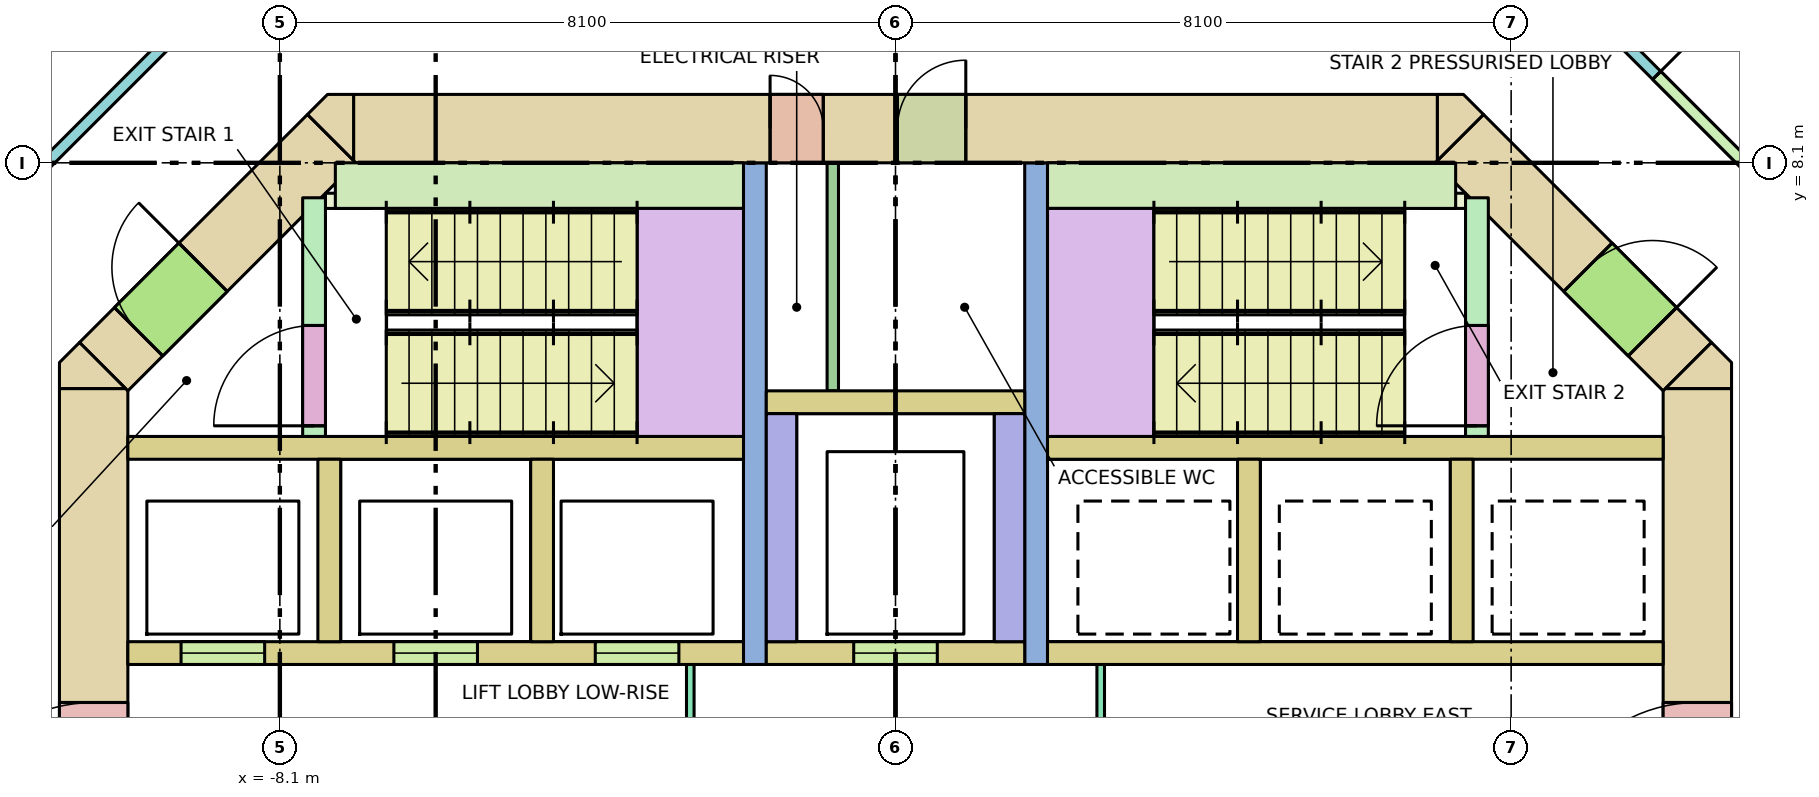
"""IFC4 building model, lengths in metres.
Left out: names, types, materials, properties, quantities, classifications, styles, units other than length and angle.
Written with IfcOpenShell. Run it as: python <this file> out.ifc"""

import sys

from ifc_helpers import new_model, si_unit, direction, frame, frame_2d, origin, place, context, subcontext, project, spatial, polyline, rectangle, outline, extrude, element, fill, save


model = new_model("IFC4")
c1 = context("Model", 3, precision=1e-05, world=origin(), true_north=direction((0.0, 1.0)))
c2 = subcontext(c1, "Body", "Model", "MODEL_VIEW")
j1 = project(units=[si_unit("LENGTHUNIT", "METRE"), si_unit("PLANEANGLEUNIT", "RADIAN")], contexts=[c1])
p1 = place(None, origin())
s1 = spatial("IfcSite", under=j1, at=p1, CompositionType="ELEMENT")
p2 = place(p1, origin())
s2 = spatial("IfcBuilding", under=s1, at=p2, CompositionType="ELEMENT")
p3 = place(p2, frame((0.0, 0.0, 86.6)))
s3 = spatial("IfcBuildingStorey", under=s2, at=p3, CompositionType="ELEMENT", Elevation=86.6)
p4 = place(p3, frame((-7.13, 8.55, -0.28), z_axis=(0.0, 0.0, 1.0), x_axis=(1.0, 0.0, 0.0)))
e1 = element("IfcWall", 1, at=p4, inside=s3, PredefinedType="SHEAR", context=c2, shape_type="SweptSolid", body=[
    extrude(rectangle(XDim=14.26, YDim=0.9, at=frame_2d((7.13, 0.0))), origin(), (0.0, 0.0, 1.0), 4.0),
])
p5 = place(p4, frame((5.48, 0.0, 0.28)))
e2 = element("IfcOpeningElement", 2, at=p5, cuts=e1, PredefinedType="OPENING", context=c2, shape_type="SweptSolid", body=[
    extrude(rectangle(XDim=0.7, YDim=2.1, at=frame_2d((0.35, 1.05))), frame((0.0, 0.46, 0.0), z_axis=(0.0, -1.0, 0.0), x_axis=(1.0, 0.0, 0.0)), (0.0, 0.0, 1.0), 0.92),
])
p6 = place(p4, frame((7.155, 0.0, 0.28)))
e3 = element("IfcOpeningElement", 3, at=p6, cuts=e1, PredefinedType="OPENING", context=c2, shape_type="SweptSolid", body=[
    extrude(rectangle(XDim=0.9, YDim=2.1, at=frame_2d((0.45, 1.05))), frame((0.0, 0.46, 0.0), z_axis=(0.0, -1.0, 0.0), x_axis=(1.0, 0.0, 0.0)), (0.0, 0.0, 1.0), 0.92),
])
p7 = place(p3, frame((-10.55, -5.13, -0.28), z_axis=(0.0, 0.0, 1.0), x_axis=(0.0, 1.0, 0.0)))
e4 = element("IfcWall", 4, at=p7, inside=s3, PredefinedType="SHEAR", context=c2, shape_type="SweptSolid", body=[
    extrude(rectangle(XDim=10.26, YDim=0.9, at=frame_2d((5.13, 0.0))), origin(), (0.0, 0.0, 1.0), 4.0),
])
p8 = place(p7, frame((4.13, 0.0, 0.28)))
e5 = element("IfcOpeningElement", 5, at=p8, cuts=e4, PredefinedType="OPENING", context=c2, shape_type="SweptSolid", body=[
    extrude(rectangle(XDim=2.0, YDim=2.1, at=frame_2d((1.0, 1.05))), frame((0.0, 0.46, 0.0), z_axis=(0.0, -1.0, 0.0), x_axis=(1.0, 0.0, 0.0)), (0.0, 0.0, 1.0), 0.92),
])
p9 = place(p3, frame((10.55, -5.13, -0.28), z_axis=(0.0, 0.0, 1.0), x_axis=(0.0, 1.0, 0.0)))
e6 = element("IfcWall", 6, at=p9, inside=s3, PredefinedType="SHEAR", context=c2, shape_type="SweptSolid", body=[
    extrude(rectangle(XDim=10.26, YDim=0.9, at=frame_2d((5.13, 0.0))), origin(), (0.0, 0.0, 1.0), 4.0),
])
p10 = place(p9, frame((4.13, 0.0, 0.28)))
e7 = element("IfcOpeningElement", 7, at=p10, cuts=e6, PredefinedType="OPENING", context=c2, shape_type="SweptSolid", body=[
    extrude(rectangle(XDim=2.0, YDim=2.1, at=frame_2d((1.0, 1.05))), frame((0.0, 0.46, 0.0), z_axis=(0.0, -1.0, 0.0), x_axis=(1.0, 0.0, 0.0)), (0.0, 0.0, 1.0), 0.92),
])
p11 = place(p3, frame((-10.418, 5.418, -0.28), z_axis=(0.0, 0.0, 1.0), x_axis=(0.707106781187, 0.707106781187, 0.0)))
e8 = element("IfcWall", 8, at=p11, inside=s3, PredefinedType="SHEAR", context=c2, shape_type="SweptSolid", body=[
    extrude(rectangle(XDim=4.243, YDim=0.9, at=frame_2d((2.121, 0.0))), origin(), (0.0, 0.0, 1.0), 4.0),
])
p12 = place(p11, frame((0.65, 0.0, 0.28)))
e9 = element("IfcOpeningElement", 9, at=p12, cuts=e8, PredefinedType="OPENING", context=c2, shape_type="SweptSolid", body=[
    extrude(rectangle(XDim=1.2, YDim=2.1, at=frame_2d((0.6, 1.05))), frame((0.0, 0.46, 0.0), z_axis=(0.0, -1.0, 0.0), x_axis=(1.0, 0.0, 0.0)), (0.0, 0.0, 1.0), 0.92),
])
p13 = place(p3, frame((7.418, 8.418, -0.28), z_axis=(0.0, 0.0, 1.0), x_axis=(0.707106781187, -0.707106781187, 0.0)))
e10 = element("IfcWall", 10, at=p13, inside=s3, PredefinedType="SHEAR", context=c2, shape_type="SweptSolid", body=[
    extrude(rectangle(XDim=4.243, YDim=0.9, at=frame_2d((2.121, 0.0))), origin(), (0.0, 0.0, 1.0), 4.0),
])
p14 = place(p13, frame((2.393, 0.0, 0.28)))
e11 = element("IfcOpeningElement", 11, at=p14, cuts=e10, PredefinedType="OPENING", context=c2, shape_type="SweptSolid", body=[
    extrude(rectangle(XDim=1.2, YDim=2.1, at=frame_2d((0.6, 1.05))), frame((0.0, 0.46, 0.0), z_axis=(0.0, -1.0, 0.0), x_axis=(1.0, 0.0, 0.0)), (0.0, 0.0, 1.0), 0.92),
])
p15 = place(p3, frame((0.0, 0.0, -0.28)))
e12 = element("IfcWall", 12, at=p15, inside=s3, PredefinedType="SHEAR", context=c2, shape_type="SweptSolid", body=[
    extrude(outline(polyline([(-10.736, 5.736), (-10.13, 5.13), (-11.0, 5.13), (-11.0, 5.473), (-10.736, 5.736)])), origin(), (0.0, 0.0, 1.0), 4.0),
])
p16 = place(p3, frame((0.0, 0.0, -0.28)))
e13 = element("IfcWall", 13, at=p16, inside=s3, PredefinedType="SHEAR", context=c2, shape_type="SweptSolid", body=[
    extrude(outline(polyline([(11.0, 5.473), (11.0, 5.13), (10.13, 5.13), (10.736, 5.736), (11.0, 5.473)])), origin(), (0.0, 0.0, 1.0), 4.0),
])
p17 = place(p3, frame((0.0, 0.0, -0.28)))
e14 = element("IfcWall", 14, at=p17, inside=s3, PredefinedType="SHEAR", context=c2, shape_type="SweptSolid", body=[
    extrude(outline(polyline([(-7.473, 9.0), (-7.13, 9.0), (-7.13, 8.13), (-7.736, 8.736), (-7.473, 9.0)])), origin(), (0.0, 0.0, 1.0), 4.0),
])
p18 = place(p3, frame((0.0, 0.0, -0.28)))
e15 = element("IfcWall", 15, at=p18, inside=s3, PredefinedType="SHEAR", context=c2, shape_type="SweptSolid", body=[
    extrude(outline(polyline([(7.473, 9.0), (7.736, 8.736), (7.13, 8.13), (7.13, 9.0), (7.473, 9.0)])), origin(), (0.0, 0.0, 1.0), 4.0),
])
for number, where, z_axis, x_axis in (
    (16, (-10.1, 4.35, 0.0), (0.0, 0.0, 1.0), (1.0, 0.0, 0.0)),
    (17, (2.0, 4.35, 0.0), (0.0, 0.0, 1.0), (1.0, 0.0, 0.0)),
):
    element("IfcWall", number, at=place(p3, frame(where, z_axis=z_axis, x_axis=x_axis)), inside=s3, PredefinedType="SOLIDWALL", context=c2, shape_type="SweptSolid", body=[
        extrude(rectangle(XDim=8.1, YDim=0.3, at=frame_2d((4.05, 0.0))), origin(), (0.0, 0.0, 1.0), 3.72),
    ])
p19 = place(p3, frame((-10.1, 1.65, 0.0), z_axis=(0.0, 0.0, 1.0), x_axis=(1.0, 0.0, 0.0)))
e18 = element("IfcWall", 18, at=p19, inside=s3, PredefinedType="SOLIDWALL", context=c2, shape_type="SweptSolid", body=[
    extrude(rectangle(XDim=8.1, YDim=0.3, at=frame_2d((4.05, 0.0))), origin(), (0.0, 0.0, 1.0), 3.72),
])
p20 = place(p19, frame((0.7, 0.0, 0.0)))
e19 = element("IfcOpeningElement", 19, at=p20, cuts=e18, PredefinedType="OPENING", context=c2, shape_type="SweptSolid", body=[
    extrude(rectangle(XDim=1.1, YDim=2.1, at=frame_2d((0.55, 1.05))), frame((0.0, 0.16, 0.0), z_axis=(0.0, -1.0, 0.0), x_axis=(1.0, 0.0, 0.0)), (0.0, 0.0, 1.0), 0.32),
])
p21 = place(p19, frame((3.5, 0.0, 0.0)))
e20 = element("IfcOpeningElement", 20, at=p21, cuts=e18, PredefinedType="OPENING", context=c2, shape_type="SweptSolid", body=[
    extrude(rectangle(XDim=1.1, YDim=2.1, at=frame_2d((0.55, 1.05))), frame((0.0, 0.16, 0.0), z_axis=(0.0, -1.0, 0.0), x_axis=(1.0, 0.0, 0.0)), (0.0, 0.0, 1.0), 0.32),
])
p22 = place(p19, frame((6.15, 0.0, 0.0)))
e21 = element("IfcOpeningElement", 21, at=p22, cuts=e18, PredefinedType="OPENING", context=c2, shape_type="SweptSolid", body=[
    extrude(rectangle(XDim=1.1, YDim=2.1, at=frame_2d((0.55, 1.05))), frame((0.0, 0.16, 0.0), z_axis=(0.0, -1.0, 0.0), x_axis=(1.0, 0.0, 0.0)), (0.0, 0.0, 1.0), 0.32),
])
p23 = place(p3, frame((2.0, 1.65, 0.0), z_axis=(0.0, 0.0, 1.0), x_axis=(1.0, 0.0, 0.0)))
e22 = element("IfcWall", 22, at=p23, inside=s3, PredefinedType="SOLIDWALL", context=c2, shape_type="SweptSolid", body=[
    extrude(rectangle(XDim=8.1, YDim=0.3, at=frame_2d((4.05, 0.0))), origin(), (0.0, 0.0, 1.0), 3.72),
])
for number, where, z_axis, x_axis in (
    (23, (-7.45, 1.8, 0.0), (0.0, 0.0, 1.0), (0.0, 1.0, 0.0)),
    (24, (-4.65, 1.8, 0.0), (0.0, 0.0, 1.0), (0.0, 1.0, 0.0)),
    (25, (4.65, 1.8, 0.0), (0.0, 0.0, 1.0), (0.0, 1.0, 0.0)),
    (26, (7.45, 1.8, 0.0), (0.0, 0.0, 1.0), (0.0, 1.0, 0.0)),
):
    element("IfcWall", number, at=place(p3, frame(where, z_axis=z_axis, x_axis=x_axis)), inside=s3, PredefinedType="SOLIDWALL", context=c2, shape_type="SweptSolid", body=[
        extrude(rectangle(XDim=2.4, YDim=0.3, at=frame_2d((1.2, 0.0))), origin(), (0.0, 0.0, 1.0), 3.72),
    ])
for number, where, z_axis, x_axis in (
    (27, (-1.85, 1.5, 0.0), (0.0, 0.0, 1.0), (0.0, 1.0, 0.0)),
    (28, (1.85, 1.5, 0.0), (0.0, 0.0, 1.0), (0.0, 1.0, 0.0)),
):
    element("IfcWall", number, at=place(p3, frame(where, z_axis=z_axis, x_axis=x_axis)), inside=s3, PredefinedType="SHEAR", context=c2, shape_type="SweptSolid", body=[
        extrude(rectangle(XDim=6.6, YDim=0.3, at=frame_2d((3.3, 0.0))), origin(), (0.0, 0.0, 1.0), 3.72),
    ])
p24 = place(p3, frame((-1.7, 1.65, 0.0), z_axis=(0.0, 0.0, 1.0), x_axis=(1.0, 0.0, 0.0)))
e29 = element("IfcWall", 29, at=p24, inside=s3, PredefinedType="SOLIDWALL", context=c2, shape_type="SweptSolid", body=[
    extrude(rectangle(XDim=3.4, YDim=0.3, at=frame_2d((1.7, 0.0))), origin(), (0.0, 0.0, 1.0), 3.72),
])
p25 = place(p24, frame((1.15, 0.0, 0.0)))
e30 = element("IfcOpeningElement", 30, at=p25, cuts=e29, PredefinedType="OPENING", context=c2, shape_type="SweptSolid", body=[
    extrude(rectangle(XDim=1.1, YDim=2.1, at=frame_2d((0.55, 1.05))), frame((0.0, 0.16, 0.0), z_axis=(0.0, -1.0, 0.0), x_axis=(1.0, 0.0, 0.0)), (0.0, 0.0, 1.0), 0.32),
])
for number, where, z_axis, x_axis in (
    (31, (-1.5, 1.8, 0.0), (0.0, 0.0, 1.0), (0.0, 1.0, 0.0)),
    (32, (1.5, 1.8, 0.0), (0.0, 0.0, 1.0), (0.0, 1.0, 0.0)),
):
    element("IfcWall", number, at=place(p3, frame(where, z_axis=z_axis, x_axis=x_axis)), inside=s3, PredefinedType="SOLIDWALL", context=c2, shape_type="SweptSolid", body=[
        extrude(rectangle(XDim=3.0, YDim=0.4, at=frame_2d((1.5, 0.0))), origin(), (0.0, 0.0, 1.0), 3.72),
    ])
p26 = place(p3, frame((-1.7, 4.95, 0.0), z_axis=(0.0, 0.0, 1.0), x_axis=(1.0, 0.0, 0.0)))
e33 = element("IfcWall", 33, at=p26, inside=s3, PredefinedType="SOLIDWALL", context=c2, shape_type="SweptSolid", body=[
    extrude(rectangle(XDim=3.4, YDim=0.3, at=frame_2d((1.7, 0.0))), origin(), (0.0, 0.0, 1.0), 3.72),
])
p27 = place(p3, frame((-7.65, 4.5, 0.0), z_axis=(0.0, 0.0, 1.0), x_axis=(0.0, 1.0, 0.0)))
e34 = element("IfcWall", 34, at=p27, inside=s3, PredefinedType="SHEAR", context=c2, shape_type="SweptSolid", body=[
    extrude(rectangle(XDim=3.14, YDim=0.3, at=frame_2d((1.57, 0.0))), origin(), (0.0, 0.0, 1.0), 3.72),
])
p28 = place(p27, frame((0.14, 0.0, 0.0)))
e35 = element("IfcOpeningElement", 35, at=p28, cuts=e34, PredefinedType="OPENING", context=c2, shape_type="SweptSolid", body=[
    extrude(rectangle(XDim=1.32, YDim=2.1, at=frame_2d((0.66, 1.05))), frame((0.0, 0.16, 0.0), z_axis=(0.0, -1.0, 0.0), x_axis=(1.0, 0.0, 0.0)), (0.0, 0.0, 1.0), 0.32),
])
p29 = place(p3, frame((-7.37, 7.8, 0.0), z_axis=(0.0, 0.0, 1.0), x_axis=(1.0, 0.0, 0.0)))
e36 = element("IfcWall", 36, at=p29, inside=s3, PredefinedType="SHEAR", context=c2, shape_type="SweptSolid", body=[
    extrude(rectangle(XDim=5.37, YDim=0.6, at=frame_2d((2.685, 0.0))), origin(), (0.0, 0.0, 1.0), 3.72),
])
p30 = place(p3, frame((7.65, 4.5, 0.0), z_axis=(0.0, 0.0, 1.0), x_axis=(0.0, 1.0, 0.0)))
e37 = element("IfcWall", 37, at=p30, inside=s3, PredefinedType="SHEAR", context=c2, shape_type="SweptSolid", body=[
    extrude(rectangle(XDim=3.14, YDim=0.3, at=frame_2d((1.57, 0.0))), origin(), (0.0, 0.0, 1.0), 3.72),
])
p31 = place(p30, frame((0.14, 0.0, 0.0)))
e38 = element("IfcOpeningElement", 38, at=p31, cuts=e37, PredefinedType="OPENING", context=c2, shape_type="SweptSolid", body=[
    extrude(rectangle(XDim=1.32, YDim=2.1, at=frame_2d((0.66, 1.05))), frame((0.0, 0.16, 0.0), z_axis=(0.0, -1.0, 0.0), x_axis=(1.0, 0.0, 0.0)), (0.0, 0.0, 1.0), 0.32),
])
p32 = place(p3, frame((2.0, 7.8, 0.0), z_axis=(0.0, 0.0, 1.0), x_axis=(1.0, 0.0, 0.0)))
e39 = element("IfcWall", 39, at=p32, inside=s3, PredefinedType="SHEAR", context=c2, shape_type="SweptSolid", body=[
    extrude(rectangle(XDim=5.37, YDim=0.6, at=frame_2d((2.685, 0.0))), origin(), (0.0, 0.0, 1.0), 3.72),
])
for number, where, z_axis, x_axis in (
    (40, (-7.5, 7.6, 0.0), (0.0, 0.0, 1.0), (1.0, 0.0, 0.0)),
    (41, (6.9, 7.6, 0.0), (0.0, 0.0, 1.0), (1.0, 0.0, 0.0)),
):
    element("IfcWall", number, at=place(p3, frame(where, z_axis=z_axis, x_axis=x_axis)), inside=s3, PredefinedType="SHEAR", context=c2, shape_type="SweptSolid", body=[
        extrude(rectangle(XDim=0.6, YDim=0.2, at=frame_2d((0.3, 0.0))), origin(), (0.0, 0.0, 1.0), 3.72),
    ])
p33 = place(p3, frame((-2.7, -1.5, 0.0), z_axis=(0.0, 0.0, 1.0), x_axis=(0.0, 1.0, 0.0)))
e42 = element("IfcWall", 42, at=p33, inside=s3, PredefinedType="PARTITIONING", context=c2, shape_type="SweptSolid", body=[
    extrude(rectangle(XDim=3.0, YDim=0.1, at=frame_2d((1.5, 0.0))), origin(), (0.0, 0.0, 1.0), 3.72),
])
p34 = place(p33, frame((0.9, 0.0, 0.0)))
e43 = element("IfcOpeningElement", 43, at=p34, cuts=e42, PredefinedType="OPENING", context=c2, shape_type="SweptSolid", body=[
    extrude(rectangle(XDim=1.2, YDim=2.1, at=frame_2d((0.6, 1.05))), frame((0.0, 0.06, 0.0), z_axis=(0.0, -1.0, 0.0), x_axis=(1.0, 0.0, 0.0)), (0.0, 0.0, 1.0), 0.12),
])
p35 = place(p3, frame((2.7, -1.5, 0.0), z_axis=(0.0, 0.0, 1.0), x_axis=(0.0, 1.0, 0.0)))
e44 = element("IfcWall", 44, at=p35, inside=s3, PredefinedType="PARTITIONING", context=c2, shape_type="SweptSolid", body=[
    extrude(rectangle(XDim=3.0, YDim=0.1, at=frame_2d((1.5, 0.0))), origin(), (0.0, 0.0, 1.0), 3.72),
])
p36 = place(p35, frame((0.9, 0.0, 0.0)))
e45 = element("IfcOpeningElement", 45, at=p36, cuts=e44, PredefinedType="OPENING", context=c2, shape_type="SweptSolid", body=[
    extrude(rectangle(XDim=1.2, YDim=2.1, at=frame_2d((0.6, 1.05))), frame((0.0, 0.06, 0.0), z_axis=(0.0, -1.0, 0.0), x_axis=(1.0, 0.0, 0.0)), (0.0, 0.0, 1.0), 0.12),
])
p37 = place(p3, frame((-0.825, 5.1, 0.0), z_axis=(0.0, 0.0, 1.0), x_axis=(0.0, 1.0, 0.0)))
e46 = element("IfcWall", 46, at=p37, inside=s3, PredefinedType="PARTITIONING", context=c2, shape_type="SweptSolid", body=[
    extrude(rectangle(XDim=3.0, YDim=0.15, at=frame_2d((1.5, 0.0))), origin(), (0.0, 0.0, 1.0), 3.72),
])
p38 = place(p3, frame((-12.975, 6.291, 0.0), z_axis=(0.0, 0.0, 1.0), x_axis=(0.707125355289, 0.707088206597, 0.0)))
e47 = element("IfcWall", 47, at=p38, inside=s3, PredefinedType="PARTITIONING", context=c2, shape_type="SweptSolid", body=[
    extrude(rectangle(XDim=6.572, YDim=0.15, at=frame_2d((3.286, 0.0))), origin(), (0.0, 0.0, 1.0), 2.82),
])
p39 = place(p3, frame((8.328, 10.938, 0.0), z_axis=(0.0, 0.0, 1.0), x_axis=(0.707125355289, -0.707088206597, 0.0)))
e48 = element("IfcWall", 48, at=p39, inside=s3, PredefinedType="PARTITIONING", context=c2, shape_type="SweptSolid", body=[
    extrude(rectangle(XDim=6.572, YDim=0.15, at=frame_2d((3.286, 0.0))), origin(), (0.0, 0.0, 1.0), 2.82),
])
p40 = place(p39, frame((2.386, 0.0, 0.0)))
e49 = element("IfcOpeningElement", 49, at=p40, cuts=e48, PredefinedType="OPENING", context=c2, shape_type="SweptSolid", body=[
    extrude(rectangle(XDim=1.8, YDim=2.1, at=frame_2d((0.9, 1.05))), frame((0.0, 0.085, 0.0), z_axis=(0.0, -1.0, 0.0), x_axis=(1.0, 0.0, 0.0)), (0.0, 0.0, 1.0), 0.17),
])
p41 = place(p20, origin())
e50 = element("IfcDoor", 50, at=p41, inside=s3, OperationType="DOUBLE_DOOR_SLIDING", PredefinedType="DOOR", context=c2, shape_type="SweptSolid", body=[
    extrude(rectangle(XDim=1.1, YDim=2.1, at=frame_2d((0.55, 1.05))), frame((0.0, 0.025, 0.0), z_axis=(0.0, -1.0, 0.0), x_axis=(1.0, 0.0, 0.0)), (0.0, 0.0, 1.0), 0.05),
])
fill(e19, e50)
p42 = place(p21, origin())
e51 = element("IfcDoor", 51, at=p42, inside=s3, OperationType="DOUBLE_DOOR_SLIDING", PredefinedType="DOOR", context=c2, shape_type="SweptSolid", body=[
    extrude(rectangle(XDim=1.1, YDim=2.1, at=frame_2d((0.55, 1.05))), frame((0.0, 0.025, 0.0), z_axis=(0.0, -1.0, 0.0), x_axis=(1.0, 0.0, 0.0)), (0.0, 0.0, 1.0), 0.05),
])
fill(e20, e51)
p43 = place(p22, origin())
e52 = element("IfcDoor", 52, at=p43, inside=s3, OperationType="DOUBLE_DOOR_SLIDING", PredefinedType="DOOR", context=c2, shape_type="SweptSolid", body=[
    extrude(rectangle(XDim=1.1, YDim=2.1, at=frame_2d((0.55, 1.05))), frame((0.0, 0.025, 0.0), z_axis=(0.0, -1.0, 0.0), x_axis=(1.0, 0.0, 0.0)), (0.0, 0.0, 1.0), 0.05),
])
fill(e21, e52)
p44 = place(p25, origin())
e53 = element("IfcDoor", 53, at=p44, inside=s3, OperationType="DOUBLE_DOOR_SLIDING", PredefinedType="DOOR", context=c2, shape_type="SweptSolid", body=[
    extrude(rectangle(XDim=1.1, YDim=2.1, at=frame_2d((0.55, 1.05))), frame((0.0, 0.025, 0.0), z_axis=(0.0, -1.0, 0.0), x_axis=(1.0, 0.0, 0.0)), (0.0, 0.0, 1.0), 0.05),
])
fill(e30, e53)
p45 = place(p28, origin())
e54 = element("IfcDoor", 54, at=p45, inside=s3, OperationType="DOUBLE_DOOR_SINGLE_SWING", PredefinedType="DOOR", context=c2, shape_type="SweptSolid", body=[
    extrude(rectangle(XDim=1.32, YDim=2.1, at=frame_2d((0.66, 1.05))), frame((0.0, 0.025, 0.0), z_axis=(0.0, -1.0, 0.0), x_axis=(1.0, 0.0, 0.0)), (0.0, 0.0, 1.0), 0.05),
])
fill(e35, e54)
p46 = place(p12, origin())
e55 = element("IfcDoor", 55, at=p46, inside=s3, OperationType="SINGLE_SWING_RIGHT", PredefinedType="DOOR", context=c2, shape_type="SweptSolid", body=[
    extrude(rectangle(XDim=1.2, YDim=2.1, at=frame_2d((0.6, 1.05))), frame((0.0, 0.025, 0.0), z_axis=(0.0, -1.0, 0.0), x_axis=(1.0, 0.0, 0.0)), (0.0, 0.0, 1.0), 0.05),
])
fill(e9, e55)
p47 = place(p31, origin())
e56 = element("IfcDoor", 56, at=p47, inside=s3, OperationType="DOUBLE_DOOR_SINGLE_SWING", PredefinedType="DOOR", context=c2, shape_type="SweptSolid", body=[
    extrude(rectangle(XDim=1.32, YDim=2.1, at=frame_2d((0.66, 1.05))), frame((0.0, 0.025, 0.0), z_axis=(0.0, -1.0, 0.0), x_axis=(1.0, 0.0, 0.0)), (0.0, 0.0, 1.0), 0.05),
])
fill(e38, e56)
p48 = place(p14, origin())
e57 = element("IfcDoor", 57, at=p48, inside=s3, OperationType="SINGLE_SWING_RIGHT", PredefinedType="DOOR", context=c2, shape_type="SweptSolid", body=[
    extrude(rectangle(XDim=1.2, YDim=2.1, at=frame_2d((0.6, 1.05))), frame((0.0, 0.025, 0.0), z_axis=(0.0, -1.0, 0.0), x_axis=(1.0, 0.0, 0.0)), (0.0, 0.0, 1.0), 0.05),
])
fill(e11, e57)
p49 = place(p8, origin())
e58 = element("IfcDoor", 58, at=p49, inside=s3, OperationType="DOUBLE_DOOR_SINGLE_SWING", PredefinedType="DOOR", context=c2, shape_type="SweptSolid", body=[
    extrude(rectangle(XDim=2.0, YDim=2.1, at=frame_2d((1.0, 1.05))), frame((0.0, 0.025, 0.0), z_axis=(0.0, -1.0, 0.0), x_axis=(1.0, 0.0, 0.0)), (0.0, 0.0, 1.0), 0.05),
])
fill(e5, e58)
p50 = place(p10, origin())
e59 = element("IfcDoor", 59, at=p50, inside=s3, OperationType="DOUBLE_DOOR_SINGLE_SWING", PredefinedType="DOOR", context=c2, shape_type="SweptSolid", body=[
    extrude(rectangle(XDim=2.0, YDim=2.1, at=frame_2d((1.0, 1.05))), frame((0.0, 0.025, 0.0), z_axis=(0.0, -1.0, 0.0), x_axis=(1.0, 0.0, 0.0)), (0.0, 0.0, 1.0), 0.05),
])
fill(e7, e59)
p51 = place(p5, origin())
e60 = element("IfcDoor", 60, at=p51, inside=s3, OperationType="SINGLE_SWING_LEFT", PredefinedType="DOOR", context=c2, shape_type="SweptSolid", body=[
    extrude(rectangle(XDim=0.7, YDim=2.1, at=frame_2d((0.35, 1.05))), frame((0.0, 0.025, 0.0), z_axis=(0.0, -1.0, 0.0), x_axis=(1.0, 0.0, 0.0)), (0.0, 0.0, 1.0), 0.05),
])
fill(e2, e60)
p52 = place(p6, origin())
e61 = element("IfcDoor", 61, at=p52, inside=s3, OperationType="SINGLE_SWING_RIGHT", PredefinedType="DOOR", context=c2, shape_type="SweptSolid", body=[
    extrude(rectangle(XDim=0.9, YDim=2.1, at=frame_2d((0.45, 1.05))), frame((0.0, 0.025, 0.0), z_axis=(0.0, -1.0, 0.0), x_axis=(1.0, 0.0, 0.0)), (0.0, 0.0, 1.0), 0.05),
])
fill(e3, e61)
p53 = place(p40, origin())
e62 = element("IfcDoor", 62, at=p53, inside=s3, OperationType="DOUBLE_DOOR_SINGLE_SWING", PredefinedType="DOOR", context=c2, shape_type="SweptSolid", body=[
    extrude(rectangle(XDim=1.8, YDim=2.1, at=frame_2d((0.9, 1.05))), frame((0.0, 0.025, 0.0), z_axis=(0.0, -1.0, 0.0), x_axis=(1.0, 0.0, 0.0)), (0.0, 0.0, 1.0), 0.05),
])
fill(e49, e62)
save(model, sys.argv[1])
